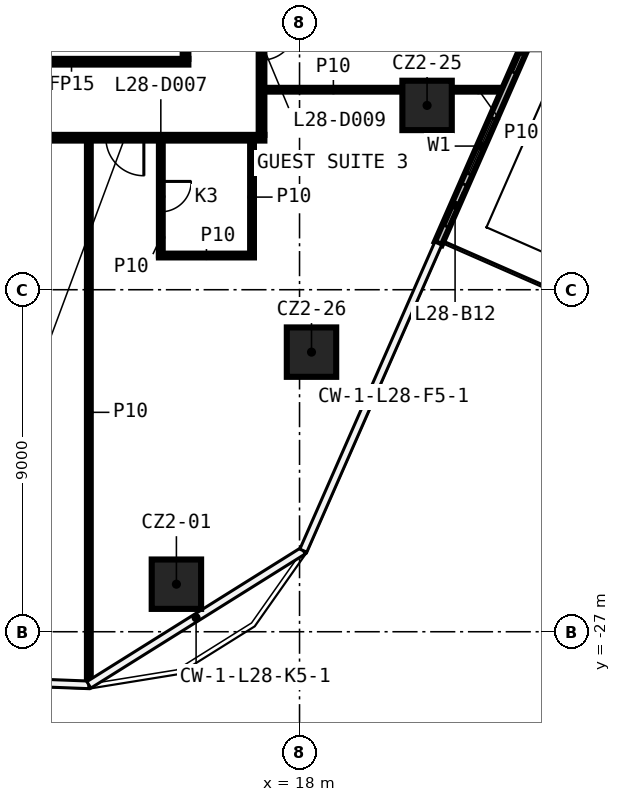
"""IFC4 building model, lengths in metres.
Left out: names, types, materials, properties, quantities, classifications, styles, units other than length and angle.
Written with IfcOpenShell. Run it as: python <this file> out.ifc"""

import sys

from ifc_helpers import new_model, si_unit, direction, frame, frame_2d, origin, origin_2d, place, context, subcontext, project, spatial, rectangle, extrude, element, fill, save


model = new_model("IFC4")
c1 = context("Model", 3, precision=1e-05, world=origin(), true_north=direction((0.0, 1.0)))
c2 = subcontext(c1, "Body", "Model", "MODEL_VIEW")
j1 = project(units=[si_unit("LENGTHUNIT", "METRE"), si_unit("PLANEANGLEUNIT", "RADIAN")], contexts=[c1])
p1 = place(None, origin())
s1 = spatial("IfcSite", under=j1, at=p1, CompositionType="ELEMENT")
p2 = place(p1, origin())
s2 = spatial("IfcBuilding", under=s1, at=p2, CompositionType="ELEMENT")
p3 = place(p2, frame((0.0, 0.0, 128.5)))
s3 = spatial("IfcBuildingStorey", under=s2, at=p3, CompositionType="ELEMENT", Elevation=128.5)
for number, where, z_axis, x_axis in (
    (1, (14.76, -25.749, 0.0), (0.0, 0.0, 1.0), (1.0, 0.0, 0.0)),
    (2, (21.356, -13.15, 0.0), (0.0, 0.0, 1.0), (1.0, 0.0, 0.0)),
    (3, (18.315, -19.642, 0.0), (0.0, 0.0, 1.0), (1.0, 0.0, 0.0)),
):
    element("IfcColumn", number, at=place(p3, frame(where, z_axis=z_axis, x_axis=x_axis)), inside=s3, PredefinedType="COLUMN", context=c2, shape_type="SweptSolid", body=[
        extrude(rectangle(XDim=1.3, YDim=1.3, at=origin_2d()), origin(), (0.0, 0.0, 1.0), 3.3),
    ])
p4 = place(p3, frame((14.3, -17.1, 0.0), z_axis=(0.0, 0.0, 1.0), x_axis=(1.0, 0.0, 0.0)))
e4 = element("IfcWall", 4, at=p4, inside=s3, PredefinedType="PARTITIONING", context=c2, shape_type="SweptSolid", body=[
    extrude(rectangle(XDim=2.5, YDim=0.1, at=frame_2d((1.25, 0.0))), origin(), (0.0, 0.0, 1.0), 3.3),
])
p5 = place(p3, frame((17.075, -14.0, 0.0), z_axis=(0.0, 0.0, 1.0), x_axis=(-1.0, 0.0, 0.0)))
e5 = element("IfcWall", 5, at=p5, inside=s3, PredefinedType="PARTITIONING", context=c2, shape_type="SweptSolid", body=[
    extrude(rectangle(XDim=34.15, YDim=0.15, at=frame_2d((17.075, 0.0))), origin(), (0.0, 0.0, 1.0), 3.3),
])
p6 = place(p5, frame((32.046, 0.0, 0.0)))
e6 = element("IfcOpeningElement", 6, at=p6, cuts=e5, PredefinedType="OPENING", context=c2, shape_type="SweptSolid", body=[
    extrude(rectangle(XDim=0.9, YDim=2.1, at=frame_2d((0.45, 1.05))), frame((0.0, 0.085, 0.0), z_axis=(0.0, -1.0, 0.0), x_axis=(1.0, 0.0, 0.0)), (0.0, 0.0, 1.0), 0.17),
])
p7 = place(p5, frame((24.32, 0.0, 0.0)))
e7 = element("IfcOpeningElement", 7, at=p7, cuts=e5, PredefinedType="OPENING", context=c2, shape_type="SweptSolid", body=[
    extrude(rectangle(XDim=1.0, YDim=2.1, at=frame_2d((0.5, 1.05))), frame((0.0, 0.085, 0.0), z_axis=(0.0, -1.0, 0.0), x_axis=(1.0, 0.0, 0.0)), (0.0, 0.0, 1.0), 0.17),
])
p8 = place(p5, frame((10.847, 0.0, 0.0)))
e8 = element("IfcOpeningElement", 8, at=p8, cuts=e5, PredefinedType="OPENING", context=c2, shape_type="SweptSolid", body=[
    extrude(rectangle(XDim=1.0, YDim=2.1, at=frame_2d((0.5, 1.05))), frame((0.0, 0.085, 0.0), z_axis=(0.0, -1.0, 0.0), x_axis=(1.0, 0.0, 0.0)), (0.0, 0.0, 1.0), 0.17),
])
p9 = place(p5, frame((3.172, 0.0, 0.0)))
e9 = element("IfcOpeningElement", 9, at=p9, cuts=e5, PredefinedType="OPENING", context=c2, shape_type="SweptSolid", body=[
    extrude(rectangle(XDim=1.0, YDim=2.1, at=frame_2d((0.5, 1.05))), frame((0.0, 0.085, 0.0), z_axis=(0.0, -1.0, 0.0), x_axis=(1.0, 0.0, 0.0)), (0.0, 0.0, 1.0), 0.17),
])
p10 = place(p3, frame((17.075, -12.737, 0.0), z_axis=(0.0, 0.0, 1.0), x_axis=(1.0, 0.0, 0.0)))
e10 = element("IfcWall", 10, at=p10, inside=s3, PredefinedType="PARTITIONING", context=c2, shape_type="SweptSolid", body=[
    extrude(rectangle(XDim=3.631, YDim=0.1, at=frame_2d((1.815, 0.0))), origin(), (0.0, 0.0, 1.0), 3.3),
])
p11 = place(p3, frame((22.006, -12.737, 0.0), z_axis=(0.0, 0.0, 1.0), x_axis=(1.0, 0.0, 0.0)))
e11 = element("IfcWall", 11, at=p11, inside=s3, PredefinedType="PARTITIONING", context=c2, shape_type="SweptSolid", body=[
    extrude(rectangle(XDim=1.4, YDim=0.1, at=frame_2d((0.7, 0.0))), origin(), (0.0, 0.0, 1.0), 3.3),
])
p12 = place(p3, frame((8.925, -12.0, 0.0), z_axis=(0.0, 0.0, 1.0), x_axis=(1.0, 0.0, 0.0)))
e12 = element("IfcWall", 12, at=p12, inside=s3, PredefinedType="PARTITIONING", context=c2, shape_type="SweptSolid", body=[
    extrude(rectangle(XDim=6.15, YDim=0.15, at=frame_2d((3.075, 0.0))), origin(), (0.0, 0.0, 1.0), 3.3),
])
p13 = place(p3, frame((17.0, 13.925, 0.0), z_axis=(0.0, 0.0, 1.0), x_axis=(0.0, -1.0, 0.0)))
e13 = element("IfcWall", 13, at=p13, inside=s3, PredefinedType="PARTITIONING", context=c2, shape_type="SweptSolid", body=[
    extrude(rectangle(XDim=27.85, YDim=0.15, at=frame_2d((13.925, 0.0))), origin(), (0.0, 0.0, 1.0), 3.3),
])
p14 = place(p13, frame((24.983, 0.0, 0.0)))
e14 = element("IfcOpeningElement", 14, at=p14, cuts=e13, PredefinedType="OPENING", context=c2, shape_type="SweptSolid", body=[
    extrude(rectangle(XDim=0.9, YDim=2.1, at=frame_2d((0.45, 1.05))), frame((0.0, 0.085, 0.0), z_axis=(0.0, -1.0, 0.0), x_axis=(1.0, 0.0, 0.0)), (0.0, 0.0, 1.0), 0.17),
])
p15 = place(p13, frame((20.143, 0.0, 0.0)))
e15 = element("IfcOpeningElement", 15, at=p15, cuts=e13, PredefinedType="OPENING", context=c2, shape_type="SweptSolid", body=[
    extrude(rectangle(XDim=0.9, YDim=2.1, at=frame_2d((0.45, 1.05))), frame((0.0, 0.085, 0.0), z_axis=(0.0, -1.0, 0.0), x_axis=(1.0, 0.0, 0.0)), (0.0, 0.0, 1.0), 0.17),
])
p16 = place(p13, frame((11.054, 0.0, 0.0)))
e16 = element("IfcOpeningElement", 16, at=p16, cuts=e13, PredefinedType="OPENING", context=c2, shape_type="SweptSolid", body=[
    extrude(rectangle(XDim=1.0, YDim=2.1, at=frame_2d((0.5, 1.05))), frame((0.0, 0.085, 0.0), z_axis=(0.0, -1.0, 0.0), x_axis=(1.0, 0.0, 0.0)), (0.0, 0.0, 1.0), 0.17),
])
p17 = place(p13, frame((7.139, 0.0, 0.0)))
e17 = element("IfcOpeningElement", 17, at=p17, cuts=e13, PredefinedType="OPENING", context=c2, shape_type="SweptSolid", body=[
    extrude(rectangle(XDim=0.9, YDim=2.1, at=frame_2d((0.45, 1.05))), frame((0.0, 0.085, 0.0), z_axis=(0.0, -1.0, 0.0), x_axis=(1.0, 0.0, 0.0)), (0.0, 0.0, 1.0), 0.17),
])
p18 = place(p3, frame((16.75, -17.05, 0.0), z_axis=(0.0, 0.0, 1.0), x_axis=(0.0, 1.0, 0.0)))
e18 = element("IfcWall", 18, at=p18, inside=s3, PredefinedType="PARTITIONING", context=c2, shape_type="SweptSolid", body=[
    extrude(rectangle(XDim=2.975, YDim=0.1, at=frame_2d((1.488, 0.0))), origin(), (0.0, 0.0, 1.0), 3.3),
])
p19 = place(p3, frame((15.0, -11.925, 0.0), z_axis=(0.0, 0.0, 1.0), x_axis=(0.0, 1.0, 0.0)))
e19 = element("IfcWall", 19, at=p19, inside=s3, PredefinedType="PARTITIONING", context=c2, shape_type="SweptSolid", body=[
    extrude(rectangle(XDim=23.85, YDim=0.15, at=frame_2d((11.925, 0.0))), origin(), (0.0, 0.0, 1.0), 3.3),
])
p20 = place(p19, frame((11.475, 0.0, 0.0)))
e20 = element("IfcOpeningElement", 20, at=p20, cuts=e19, PredefinedType="OPENING", context=c2, shape_type="SweptSolid", body=[
    extrude(rectangle(XDim=0.9, YDim=2.1, at=frame_2d((0.45, 1.05))), frame((0.0, 0.085, 0.0), z_axis=(0.0, -1.0, 0.0), x_axis=(1.0, 0.0, 0.0)), (0.0, 0.0, 1.0), 0.17),
])
p21 = place(p3, frame((14.35, -14.075, 0.0), z_axis=(0.0, 0.0, 1.0), x_axis=(0.0, -1.0, 0.0)))
e21 = element("IfcWall", 21, at=p21, inside=s3, PredefinedType="PARTITIONING", context=c2, shape_type="SweptSolid", body=[
    extrude(rectangle(XDim=3.025, YDim=0.1, at=frame_2d((1.513, 0.0))), origin(), (0.0, 0.0, 1.0), 3.3),
])
p22 = place(p21, frame((1.075, 0.0, 0.0)))
e22 = element("IfcOpeningElement", 22, at=p22, cuts=e21, PredefinedType="OPENING", context=c2, shape_type="SweptSolid", body=[
    extrude(rectangle(XDim=0.8, YDim=2.1, at=frame_2d((0.4, 1.05))), frame((0.0, 0.06, 0.0), z_axis=(0.0, -1.0, 0.0), x_axis=(1.0, 0.0, 0.0)), (0.0, 0.0, 1.0), 0.12),
])
p23 = place(p3, frame((12.456, -28.378, 0.0), z_axis=(0.0, 0.0, 1.0), x_axis=(0.0, 1.0, 0.0)))
e23 = element("IfcWall", 23, at=p23, inside=s3, PredefinedType="PARTITIONING", context=c2, shape_type="SweptSolid", body=[
    extrude(rectangle(XDim=14.303, YDim=0.1, at=frame_2d((7.151, 0.0))), origin(), (0.0, 0.0, 1.0), 3.3),
])
p24 = place(p3, frame((21.65, -16.783, 0.0), z_axis=(0.0, 0.0, 1.0), x_axis=(0.402171088909, 0.915564533633, 0.0)))
e24 = element("IfcWall", 24, at=p24, inside=s3, PredefinedType="SOLIDWALL", context=c2, shape_type="SweptSolid", body=[
    extrude(rectangle(XDim=17.677, YDim=0.2, at=frame_2d((8.838, 0.0))), origin(), (0.0, 0.0, 1.0), 3.3),
])
p25 = place(p24, frame((2.0, 0.0, 0.6)))
e25 = element("IfcOpeningElement", 25, at=p25, cuts=e24, PredefinedType="OPENING", context=c2, shape_type="SweptSolid", body=[
    extrude(rectangle(XDim=1.6, YDim=2.4, at=frame_2d((0.8, 1.2))), frame((0.0, 0.11, 0.0), z_axis=(0.0, -1.0, 0.0), x_axis=(1.0, 0.0, 0.0)), (0.0, 0.0, 1.0), 0.22),
])
p26 = place(p24, frame((0.5, 0.0, 0.0)))
e26 = element("IfcOpeningElement", 26, at=p26, cuts=e24, PredefinedType="OPENING", context=c2, shape_type="SweptSolid", body=[
    extrude(rectangle(XDim=1.2, YDim=2.4, at=frame_2d((0.6, 1.2))), frame((0.0, 0.11, 0.0), z_axis=(0.0, -1.0, 0.0), x_axis=(1.0, 0.0, 0.0)), (0.0, 0.0, 1.0), 0.22),
])
p27 = place(p24, frame((6.419, 0.0, 0.6)))
e27 = element("IfcOpeningElement", 27, at=p27, cuts=e24, PredefinedType="OPENING", context=c2, shape_type="SweptSolid", body=[
    extrude(rectangle(XDim=1.6, YDim=2.4, at=frame_2d((0.8, 1.2))), frame((0.0, 0.11, 0.0), z_axis=(0.0, -1.0, 0.0), x_axis=(1.0, 0.0, 0.0)), (0.0, 0.0, 1.0), 0.22),
])
p28 = place(p24, frame((4.919, 0.0, 0.0)))
e28 = element("IfcOpeningElement", 28, at=p28, cuts=e24, PredefinedType="OPENING", context=c2, shape_type="SweptSolid", body=[
    extrude(rectangle(XDim=1.2, YDim=2.4, at=frame_2d((0.6, 1.2))), frame((0.0, 0.11, 0.0), z_axis=(0.0, -1.0, 0.0), x_axis=(1.0, 0.0, 0.0)), (0.0, 0.0, 1.0), 0.22),
])
p29 = place(p24, frame((9.338, 0.0, 0.6)))
e29 = element("IfcOpeningElement", 29, at=p29, cuts=e24, PredefinedType="OPENING", context=c2, shape_type="SweptSolid", body=[
    extrude(rectangle(XDim=1.6, YDim=2.4, at=frame_2d((0.8, 1.2))), frame((0.0, 0.11, 0.0), z_axis=(0.0, -1.0, 0.0), x_axis=(1.0, 0.0, 0.0)), (0.0, 0.0, 1.0), 0.22),
])
p30 = place(p24, frame((11.338, 0.0, 0.0)))
e30 = element("IfcOpeningElement", 30, at=p30, cuts=e24, PredefinedType="OPENING", context=c2, shape_type="SweptSolid", body=[
    extrude(rectangle(XDim=1.2, YDim=2.4, at=frame_2d((0.6, 1.2))), frame((0.0, 0.11, 0.0), z_axis=(0.0, -1.0, 0.0), x_axis=(1.0, 0.0, 0.0)), (0.0, 0.0, 1.0), 0.22),
])
p31 = place(p24, frame((15.258, 0.0, 0.6)))
e31 = element("IfcOpeningElement", 31, at=p31, cuts=e24, PredefinedType="OPENING", context=c2, shape_type="SweptSolid", body=[
    extrude(rectangle(XDim=1.6, YDim=2.4, at=frame_2d((0.8, 1.2))), frame((0.0, 0.11, 0.0), z_axis=(0.0, -1.0, 0.0), x_axis=(1.0, 0.0, 0.0)), (0.0, 0.0, 1.0), 0.22),
])
p32 = place(p24, frame((13.758, 0.0, 0.0)))
e32 = element("IfcOpeningElement", 32, at=p32, cuts=e24, PredefinedType="OPENING", context=c2, shape_type="SweptSolid", body=[
    extrude(rectangle(XDim=1.2, YDim=2.4, at=frame_2d((0.6, 1.2))), frame((0.0, 0.11, 0.0), z_axis=(0.0, -1.0, 0.0), x_axis=(1.0, 0.0, 0.0)), (0.0, 0.0, 1.0), 0.22),
])
p33 = place(p22, origin())
e33 = element("IfcDoor", 33, at=p33, inside=s3, OperationType="SINGLE_SWING_RIGHT", PredefinedType="DOOR", context=c2, shape_type="SweptSolid", body=[
    extrude(rectangle(XDim=0.8, YDim=2.1, at=frame_2d((0.4, 1.05))), frame((0.0, 0.025, 0.0), z_axis=(0.0, -1.0, 0.0), x_axis=(1.0, 0.0, 0.0)), (0.0, 0.0, 1.0), 0.05),
])
fill(e22, e33)
p34 = place(p9, origin())
e34 = element("IfcDoor", 34, at=p34, inside=s3, OperationType="SINGLE_SWING_LEFT", PredefinedType="DOOR", context=c2, shape_type="SweptSolid", body=[
    extrude(rectangle(XDim=1.0, YDim=2.1, at=frame_2d((0.5, 1.05))), frame((0.0, 0.025, 0.0), z_axis=(0.0, -1.0, 0.0), x_axis=(1.0, 0.0, 0.0)), (0.0, 0.0, 1.0), 0.05),
])
fill(e9, e34)
p35 = place(p14, origin())
e35 = element("IfcDoor", 35, at=p35, inside=s3, OperationType="SINGLE_SWING_RIGHT", PredefinedType="DOOR", context=c2, shape_type="SweptSolid", body=[
    extrude(rectangle(XDim=0.9, YDim=2.1, at=frame_2d((0.45, 1.05))), frame((0.0, 0.025, 0.0), z_axis=(0.0, -1.0, 0.0), x_axis=(1.0, 0.0, 0.0)), (0.0, 0.0, 1.0), 0.05),
])
fill(e14, e35)
p36 = place(p25, origin())
e36 = element("IfcWindow", 36, at=p36, inside=s3, PartitioningType="SINGLE_PANEL", PredefinedType="WINDOW", context=c2, shape_type="SweptSolid", body=[
    extrude(rectangle(XDim=1.6, YDim=2.4, at=frame_2d((0.8, 1.2))), frame((0.0, 0.03, 0.0), z_axis=(0.0, -1.0, 0.0), x_axis=(1.0, 0.0, 0.0)), (0.0, 0.0, 1.0), 0.06),
])
fill(e25, e36)
p37 = place(p26, origin())
e37 = element("IfcDoor", 37, at=p37, inside=s3, OperationType="SLIDING_TO_LEFT", PredefinedType="DOOR", context=c2, shape_type="SweptSolid", body=[
    extrude(rectangle(XDim=1.2, YDim=2.4, at=frame_2d((0.6, 1.2))), frame((0.0, 0.025, 0.0), z_axis=(0.0, -1.0, 0.0), x_axis=(1.0, 0.0, 0.0)), (0.0, 0.0, 1.0), 0.05),
])
fill(e26, e37)
p38 = place(p28, origin())
e38 = element("IfcDoor", 38, at=p38, inside=s3, OperationType="SLIDING_TO_LEFT", PredefinedType="DOOR", context=c2, shape_type="SweptSolid", body=[
    extrude(rectangle(XDim=1.2, YDim=2.4, at=frame_2d((0.6, 1.2))), frame((0.0, 0.025, 0.0), z_axis=(0.0, -1.0, 0.0), x_axis=(1.0, 0.0, 0.0)), (0.0, 0.0, 1.0), 0.05),
])
fill(e28, e38)
save(model, sys.argv[1])
